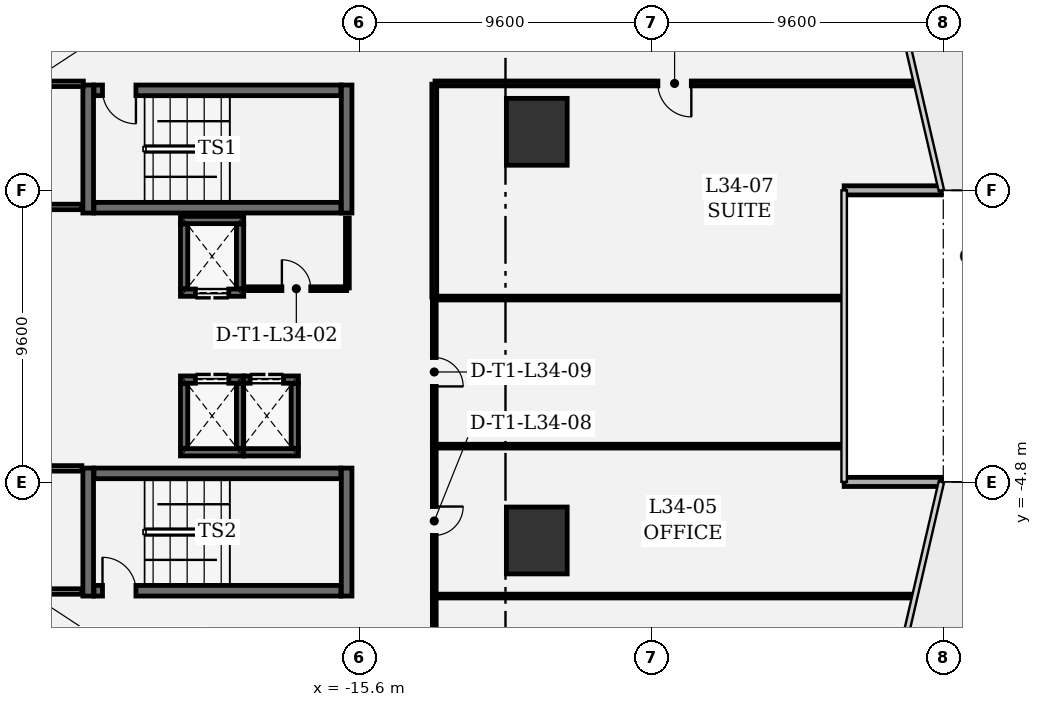
"""IFC4 building model, lengths in metres.
Left out: names, types, materials, properties, quantities, classifications, styles, units other than length and angle.
Written with IfcOpenShell. Run it as: python <this file> out.ifc"""

import sys

from ifc_helpers import new_model, si_unit, direction, frame, frame_2d, origin, origin_2d, place, context, subcontext, project, spatial, rectangle, extrude, element, fill, save


model = new_model("IFC4")
c1 = context("Model", 3, precision=1e-05, world=origin(), true_north=direction((0.0, 1.0)))
c2 = subcontext(c1, "Body", "Model", "MODEL_VIEW")
j1 = project(units=[si_unit("LENGTHUNIT", "METRE"), si_unit("PLANEANGLEUNIT", "RADIAN")], contexts=[c1])
p1 = place(None, origin())
s1 = spatial("IfcSite", under=j1, at=p1, CompositionType="ELEMENT")
p2 = place(p1, origin())
s2 = spatial("IfcBuilding", under=s1, at=p2, CompositionType="ELEMENT")
p3 = place(p2, frame((0.0, 0.0, 150.3)))
s3 = spatial("IfcBuildingStorey", under=s2, at=p3, CompositionType="ELEMENT", Elevation=150.3)
for number, where, z_axis, x_axis in (
    (1, (-9.77, -6.721, 0.0), (0.0, 0.0, 1.0), (1.0, 0.0, 0.0)),
    (2, (-9.77, 6.721, 0.0), (0.0, 0.0, 1.0), (1.0, 0.0, 0.0)),
):
    element("IfcColumn", number, at=place(p3, frame(where, z_axis=z_axis, x_axis=x_axis)), inside=s3, PredefinedType="COLUMN", context=c2, shape_type="SweptSolid", body=[
        extrude(rectangle(XDim=2.0, YDim=2.2, at=origin_2d()), origin(), (0.0, 0.0, 1.0), 4.05),
    ])
for number, where, z_axis, x_axis in (
    (3, (3.537, -4.795, 0.0), (0.0, 0.0, 1.0), (-1.0, 0.0, 0.0)),
    (4, (0.34, 4.795, 0.0), (0.0, 0.0, 1.0), (1.0, 0.0, 0.0)),
):
    element("IfcWall", number, at=place(p3, frame(where, z_axis=z_axis, x_axis=x_axis)), inside=s3, PredefinedType="SOLIDWALL", context=c2, shape_type="SweptSolid", body=[
        extrude(rectangle(XDim=3.197, YDim=0.3, at=frame_2d((1.598, 0.0))), origin(), (0.0, 0.0, 1.0), 3.78),
    ])
for number, where, z_axis, x_axis in (
    (5, (-24.525, 8.26, 0.0), (0.0, 0.0, 1.0), (0.0, -1.0, 0.0)),
    (6, (-16.025, 4.05, 0.0), (0.0, 0.0, 1.0), (0.0, 1.0, 0.0)),
):
    element("IfcWall", number, at=place(p3, frame(where, z_axis=z_axis, x_axis=x_axis)), inside=s3, PredefinedType="SHEAR", context=c2, shape_type="SweptSolid", body=[
        extrude(rectangle(XDim=4.21, YDim=0.35, at=frame_2d((2.105, 0.0))), origin(), (0.0, 0.0, 1.0), 3.78),
    ])
p4 = place(p3, frame((-24.335, 4.225, 0.0), z_axis=(0.0, 0.0, 1.0), x_axis=(1.0, 0.0, 0.0)))
e7 = element("IfcWall", 7, at=p4, inside=s3, PredefinedType="SHEAR", context=c2, shape_type="SweptSolid", body=[
    extrude(rectangle(XDim=8.12, YDim=0.35, at=frame_2d((4.06, 0.0))), origin(), (0.0, 0.0, 1.0), 3.78),
])
p5 = place(p3, frame((-16.215, 8.085, 0.0), z_axis=(0.0, 0.0, 1.0), x_axis=(-1.0, 0.0, 0.0)))
e8 = element("IfcWall", 8, at=p5, inside=s3, PredefinedType="SHEAR", context=c2, shape_type="SweptSolid", body=[
    extrude(rectangle(XDim=8.12, YDim=0.35, at=frame_2d((4.06, 0.0))), origin(), (0.0, 0.0, 1.0), 3.78),
])
p6 = place(p5, frame((6.74, 0.0, 0.0)))
e9 = element("IfcOpeningElement", 9, at=p6, cuts=e8, PredefinedType="OPENING", context=c2, shape_type="SweptSolid", body=[
    extrude(rectangle(XDim=1.1, YDim=2.2, at=frame_2d((0.55, 1.1))), frame((0.0, 0.185, 0.0), z_axis=(0.0, -1.0, 0.0), x_axis=(1.0, 0.0, 0.0)), (0.0, 0.0, 1.0), 0.37),
])
for number, where, z_axis, x_axis in (
    (10, (-24.525, -4.34, 0.0), (0.0, 0.0, 1.0), (0.0, -1.0, 0.0)),
    (11, (-16.025, -8.55, 0.0), (0.0, 0.0, 1.0), (0.0, 1.0, 0.0)),
):
    element("IfcWall", number, at=place(p3, frame(where, z_axis=z_axis, x_axis=x_axis)), inside=s3, PredefinedType="SHEAR", context=c2, shape_type="SweptSolid", body=[
        extrude(rectangle(XDim=4.21, YDim=0.35, at=frame_2d((2.105, 0.0))), origin(), (0.0, 0.0, 1.0), 3.78),
    ])
p7 = place(p3, frame((-24.335, -8.375, 0.0), z_axis=(0.0, 0.0, 1.0), x_axis=(1.0, 0.0, 0.0)))
e12 = element("IfcWall", 12, at=p7, inside=s3, PredefinedType="SHEAR", context=c2, shape_type="SweptSolid", body=[
    extrude(rectangle(XDim=8.12, YDim=0.35, at=frame_2d((4.06, 0.0))), origin(), (0.0, 0.0, 1.0), 3.78),
])
p8 = place(p7, frame((0.28, 0.0, 0.0)))
e13 = element("IfcOpeningElement", 13, at=p8, cuts=e12, PredefinedType="OPENING", context=c2, shape_type="SweptSolid", body=[
    extrude(rectangle(XDim=1.1, YDim=2.2, at=frame_2d((0.55, 1.1))), frame((0.0, 0.185, 0.0), z_axis=(0.0, -1.0, 0.0), x_axis=(1.0, 0.0, 0.0)), (0.0, 0.0, 1.0), 0.37),
])
p9 = place(p3, frame((-16.215, -4.515, 0.0), z_axis=(0.0, 0.0, 1.0), x_axis=(-1.0, 0.0, 0.0)))
e14 = element("IfcWall", 14, at=p9, inside=s3, PredefinedType="SHEAR", context=c2, shape_type="SweptSolid", body=[
    extrude(rectangle(XDim=8.12, YDim=0.35, at=frame_2d((4.06, 0.0))), origin(), (0.0, 0.0, 1.0), 3.78),
])
p10 = place(p3, frame((-19.41, 1.43, 0.0), z_axis=(0.0, 0.0, 1.0), x_axis=(-1.0, 0.0, 0.0)))
e15 = element("IfcWall", 15, at=p10, inside=s3, PredefinedType="SHEAR", context=c2, shape_type="SweptSolid", body=[
    extrude(rectangle(XDim=2.08, YDim=0.24, at=frame_2d((1.04, 0.0))), origin(), (0.0, 0.0, 1.0), 3.78),
])
p11 = place(p10, frame((0.49, 0.0, 0.0)))
e16 = element("IfcOpeningElement", 16, at=p11, cuts=e15, PredefinedType="OPENING", context=c2, shape_type="SweptSolid", body=[
    extrude(rectangle(XDim=1.1, YDim=2.2, at=frame_2d((0.55, 1.1))), frame((0.0, 0.13, 0.0), z_axis=(0.0, -1.0, 0.0), x_axis=(1.0, 0.0, 0.0)), (0.0, 0.0, 1.0), 0.26),
])
p12 = place(p3, frame((-21.49, 3.82, 0.0), z_axis=(0.0, 0.0, 1.0), x_axis=(1.0, 0.0, 0.0)))
e17 = element("IfcWall", 17, at=p12, inside=s3, PredefinedType="SHEAR", context=c2, shape_type="SweptSolid", body=[
    extrude(rectangle(XDim=2.08, YDim=0.24, at=frame_2d((1.04, 0.0))), origin(), (0.0, 0.0, 1.0), 3.78),
])
for number, where, z_axis, x_axis in (
    (18, (-21.37, 1.562, 0.0), (0.0, 0.0, 1.0), (0.0, 1.0, 0.0)),
    (19, (-19.53, 3.688, 0.0), (0.0, 0.0, 1.0), (0.0, -1.0, 0.0)),
):
    element("IfcWall", number, at=place(p3, frame(where, z_axis=z_axis, x_axis=x_axis)), inside=s3, PredefinedType="SHEAR", context=c2, shape_type="SweptSolid", body=[
        extrude(rectangle(XDim=2.126, YDim=0.24, at=frame_2d((1.063, 0.0))), origin(), (0.0, 0.0, 1.0), 3.78),
    ])
p13 = place(p3, frame((-19.41, -3.82, 0.0), z_axis=(0.0, 0.0, 1.0), x_axis=(-1.0, 0.0, 0.0)))
e20 = element("IfcWall", 20, at=p13, inside=s3, PredefinedType="SHEAR", context=c2, shape_type="SweptSolid", body=[
    extrude(rectangle(XDim=2.08, YDim=0.24, at=frame_2d((1.04, 0.0))), origin(), (0.0, 0.0, 1.0), 3.78),
])
p14 = place(p3, frame((-21.49, -1.43, 0.0), z_axis=(0.0, 0.0, 1.0), x_axis=(1.0, 0.0, 0.0)))
e21 = element("IfcWall", 21, at=p14, inside=s3, PredefinedType="SHEAR", context=c2, shape_type="SweptSolid", body=[
    extrude(rectangle(XDim=2.08, YDim=0.24, at=frame_2d((1.04, 0.0))), origin(), (0.0, 0.0, 1.0), 3.78),
])
p15 = place(p14, frame((0.49, 0.0, 0.0)))
e22 = element("IfcOpeningElement", 22, at=p15, cuts=e21, PredefinedType="OPENING", context=c2, shape_type="SweptSolid", body=[
    extrude(rectangle(XDim=1.1, YDim=2.2, at=frame_2d((0.55, 1.1))), frame((0.0, 0.13, 0.0), z_axis=(0.0, -1.0, 0.0), x_axis=(1.0, 0.0, 0.0)), (0.0, 0.0, 1.0), 0.26),
])
for number, where, z_axis, x_axis in (
    (23, (-21.37, -3.688, 0.0), (0.0, 0.0, 1.0), (0.0, 1.0, 0.0)),
    (24, (-19.53, -1.562, 0.0), (0.0, 0.0, 1.0), (0.0, -1.0, 0.0)),
):
    element("IfcWall", number, at=place(p3, frame(where, z_axis=z_axis, x_axis=x_axis)), inside=s3, PredefinedType="SHEAR", context=c2, shape_type="SweptSolid", body=[
        extrude(rectangle(XDim=2.126, YDim=0.24, at=frame_2d((1.063, 0.0))), origin(), (0.0, 0.0, 1.0), 3.78),
    ])
p16 = place(p3, frame((-17.61, -3.82, 0.0), z_axis=(0.0, 0.0, 1.0), x_axis=(-1.0, 0.0, 0.0)))
e25 = element("IfcWall", 25, at=p16, inside=s3, PredefinedType="SHEAR", context=c2, shape_type="SweptSolid", body=[
    extrude(rectangle(XDim=1.8, YDim=0.24, at=frame_2d((0.9, 0.0))), origin(), (0.0, 0.0, 1.0), 3.78),
])
p17 = place(p3, frame((-19.41, -1.43, 0.0), z_axis=(0.0, 0.0, 1.0), x_axis=(1.0, 0.0, 0.0)))
e26 = element("IfcWall", 26, at=p17, inside=s3, PredefinedType="SHEAR", context=c2, shape_type="SweptSolid", body=[
    extrude(rectangle(XDim=1.8, YDim=0.24, at=frame_2d((0.9, 0.0))), origin(), (0.0, 0.0, 1.0), 3.78),
])
p18 = place(p17, frame((0.21, 0.0, 0.0)))
e27 = element("IfcOpeningElement", 27, at=p18, cuts=e26, PredefinedType="OPENING", context=c2, shape_type="SweptSolid", body=[
    extrude(rectangle(XDim=1.1, YDim=2.2, at=frame_2d((0.55, 1.1))), frame((0.0, 0.13, 0.0), z_axis=(0.0, -1.0, 0.0), x_axis=(1.0, 0.0, 0.0)), (0.0, 0.0, 1.0), 0.26),
])
p19 = place(p3, frame((-17.73, -1.562, 0.0), z_axis=(0.0, 0.0, 1.0), x_axis=(0.0, -1.0, 0.0)))
e28 = element("IfcWall", 28, at=p19, inside=s3, PredefinedType="SHEAR", context=c2, shape_type="SweptSolid", body=[
    extrude(rectangle(XDim=2.126, YDim=0.24, at=frame_2d((1.063, 0.0))), origin(), (0.0, 0.0, 1.0), 3.78),
])
p20 = place(p3, frame((-28.355, 4.25, 0.0), z_axis=(0.0, 0.0, 1.0), x_axis=(1.0, 0.0, 0.0)))
e29 = element("IfcWall", 29, at=p20, inside=s3, PredefinedType="PARTITIONING", context=c2, shape_type="SweptSolid", body=[
    extrude(rectangle(XDim=3.622, YDim=0.18, at=frame_2d((1.811, 0.0))), origin(), (0.0, 0.0, 1.0), 3.78),
])
p21 = place(p3, frame((-24.684, 8.3, 0.0), z_axis=(0.0, 0.0, 1.0), x_axis=(-1.0, 0.0, 0.0)))
e30 = element("IfcWall", 30, at=p21, inside=s3, PredefinedType="PARTITIONING", context=c2, shape_type="SweptSolid", body=[
    extrude(rectangle(XDim=3.671, YDim=0.18, at=frame_2d((1.835, 0.0))), origin(), (0.0, 0.0, 1.0), 3.78),
])
p22 = place(p21, frame((1.335, 0.0, 0.0)))
e31 = element("IfcOpeningElement", 31, at=p22, cuts=e30, PredefinedType="OPENING", context=c2, shape_type="SweptSolid", body=[
    extrude(rectangle(XDim=1.0, YDim=2.15, at=frame_2d((0.5, 1.075))), frame((0.0, 0.1, 0.0), z_axis=(0.0, -1.0, 0.0), x_axis=(1.0, 0.0, 0.0)), (0.0, 0.0, 1.0), 0.2),
])
p23 = place(p3, frame((-28.355, -8.4, 0.0), z_axis=(0.0, 0.0, 1.0), x_axis=(1.0, 0.0, 0.0)))
e32 = element("IfcWall", 32, at=p23, inside=s3, PredefinedType="PARTITIONING", context=c2, shape_type="SweptSolid", body=[
    extrude(rectangle(XDim=3.622, YDim=0.18, at=frame_2d((1.811, 0.0))), origin(), (0.0, 0.0, 1.0), 3.78),
])
p24 = place(p23, frame((1.311, 0.0, 0.0)))
e33 = element("IfcOpeningElement", 33, at=p24, cuts=e32, PredefinedType="OPENING", context=c2, shape_type="SweptSolid", body=[
    extrude(rectangle(XDim=1.0, YDim=2.15, at=frame_2d((0.5, 1.075))), frame((0.0, 0.1, 0.0), z_axis=(0.0, -1.0, 0.0), x_axis=(1.0, 0.0, 0.0)), (0.0, 0.0, 1.0), 0.2),
])
p25 = place(p3, frame((-24.733, -4.35, 0.0), z_axis=(0.0, 0.0, 1.0), x_axis=(-1.0, 0.0, 0.0)))
e34 = element("IfcWall", 34, at=p25, inside=s3, PredefinedType="PARTITIONING", context=c2, shape_type="SweptSolid", body=[
    extrude(rectangle(XDim=3.622, YDim=0.18, at=frame_2d((1.811, 0.0))), origin(), (0.0, 0.0, 1.0), 3.78),
])
p26 = place(p3, frame((-19.334, 1.56, 0.0), z_axis=(0.0, 0.0, 1.0), x_axis=(1.0, 0.0, 0.0)))
e35 = element("IfcWall", 35, at=p26, inside=s3, PredefinedType="PARTITIONING", context=c2, shape_type="SweptSolid", body=[
    extrude(rectangle(XDim=3.309, YDim=0.125, at=frame_2d((1.654, 0.0))), origin(), (0.0, 0.0, 1.0), 3.78),
])
p27 = place(p26, frame((1.179, 0.0, 0.0)))
e36 = element("IfcOpeningElement", 36, at=p27, cuts=e35, PredefinedType="OPENING", context=c2, shape_type="SweptSolid", body=[
    extrude(rectangle(XDim=0.95, YDim=2.15, at=frame_2d((0.475, 1.075))), frame((0.0, 0.073, 0.0), z_axis=(0.0, -1.0, 0.0), x_axis=(1.0, 0.0, 0.0)), (0.0, 0.0, 1.0), 0.145),
])
p28 = place(p3, frame((-16.0, 1.585, 0.0), z_axis=(0.0, 0.0, 1.0), x_axis=(0.0, 1.0, 0.0)))
e37 = element("IfcWall", 37, at=p28, inside=s3, PredefinedType="PARTITIONING", context=c2, shape_type="SweptSolid", body=[
    extrude(rectangle(XDim=2.302, YDim=0.125, at=frame_2d((1.151, 0.0))), origin(), (0.0, 0.0, 1.0), 3.78),
])
p29 = place(p3, frame((2.587, -8.55, 0.0), z_axis=(0.0, 0.0, 1.0), x_axis=(-1.0, 0.0, 0.0)))
e38 = element("IfcWall", 38, at=p29, inside=s3, PredefinedType="PARTITIONING", context=c2, shape_type="SweptSolid", body=[
    extrude(rectangle(XDim=15.704, YDim=0.125, at=frame_2d((7.852, 0.0))), origin(), (0.0, 0.0, 1.0), 2.895),
])
p30 = place(p3, frame((-13.142, -10.933, 0.0), z_axis=(0.0, 0.0, 1.0), x_axis=(0.0, 1.0, 0.0)))
e39 = element("IfcWall", 39, at=p30, inside=s3, PredefinedType="PARTITIONING", context=c2, shape_type="SweptSolid", body=[
    extrude(rectangle(XDim=2.358, YDim=0.125, at=frame_2d((1.179, 0.0))), origin(), (0.0, 0.0, 1.0), 3.78),
])
p31 = place(p3, frame((0.26, -3.619, 0.0), z_axis=(0.0, 0.0, 1.0), x_axis=(-1.0, 0.0, 0.0)))
e40 = element("IfcWall", 40, at=p31, inside=s3, PredefinedType="PARTITIONING", context=c2, shape_type="SweptSolid", body=[
    extrude(rectangle(XDim=13.377, YDim=0.125, at=frame_2d((6.688, 0.0))), origin(), (0.0, 0.0, 1.0), 3.78),
])
p32 = place(p3, frame((-13.142, -3.644, 0.0), z_axis=(0.0, 0.0, 1.0), x_axis=(0.0, -1.0, 0.0)))
e41 = element("IfcWall", 41, at=p32, inside=s3, PredefinedType="PARTITIONING", context=c2, shape_type="SweptSolid", body=[
    extrude(rectangle(XDim=4.873, YDim=0.125, at=frame_2d((2.437, 0.0))), origin(), (0.0, 0.0, 1.0), 3.78),
])
p33 = place(p32, frame((1.962, 0.0, 0.0)))
e42 = element("IfcOpeningElement", 42, at=p33, cuts=e41, PredefinedType="OPENING", context=c2, shape_type="SweptSolid", body=[
    extrude(rectangle(XDim=0.95, YDim=2.15, at=frame_2d((0.475, 1.075))), frame((0.0, 0.073, 0.0), z_axis=(0.0, -1.0, 0.0), x_axis=(1.0, 0.0, 0.0)), (0.0, 0.0, 1.0), 0.145),
])
p34 = place(p3, frame((-13.142, 1.227, 0.0), z_axis=(0.0, 0.0, 1.0), x_axis=(0.0, -1.0, 0.0)))
e43 = element("IfcWall", 43, at=p34, inside=s3, PredefinedType="PARTITIONING", context=c2, shape_type="SweptSolid", body=[
    extrude(rectangle(XDim=4.813, YDim=0.125, at=frame_2d((2.406, 0.0))), origin(), (0.0, 0.0, 1.0), 3.78),
])
p35 = place(p34, frame((1.931, 0.0, 0.0)))
e44 = element("IfcOpeningElement", 44, at=p35, cuts=e43, PredefinedType="OPENING", context=c2, shape_type="SweptSolid", body=[
    extrude(rectangle(XDim=0.95, YDim=2.15, at=frame_2d((0.475, 1.075))), frame((0.0, 0.073, 0.0), z_axis=(0.0, -1.0, 0.0), x_axis=(1.0, 0.0, 0.0)), (0.0, 0.0, 1.0), 0.145),
])
p36 = place(p3, frame((0.26, 1.252, 0.0), z_axis=(0.0, 0.0, 1.0), x_axis=(-1.0, 0.0, 0.0)))
e45 = element("IfcWall", 45, at=p36, inside=s3, PredefinedType="PARTITIONING", context=c2, shape_type="SweptSolid", body=[
    extrude(rectangle(XDim=13.377, YDim=0.125, at=frame_2d((6.688, 0.0))), origin(), (0.0, 0.0, 1.0), 3.78),
])
p37 = place(p3, frame((2.642, 8.312, 0.0), z_axis=(0.0, 0.0, 1.0), x_axis=(-1.0, 0.0, 0.0)))
e46 = element("IfcWall", 46, at=p37, inside=s3, PredefinedType="PARTITIONING", context=c2, shape_type="SweptSolid", body=[
    extrude(rectangle(XDim=15.759, YDim=0.16, at=frame_2d((7.88, 0.0))), origin(), (0.0, 0.0, 1.0), 2.895),
])
p38 = place(p37, frame((7.33, 0.0, 0.0)))
e47 = element("IfcOpeningElement", 47, at=p38, cuts=e46, PredefinedType="OPENING", context=c2, shape_type="SweptSolid", body=[
    extrude(rectangle(XDim=1.1, YDim=2.15, at=frame_2d((0.55, 1.075))), frame((0.0, 0.09, 0.0), z_axis=(0.0, -1.0, 0.0), x_axis=(1.0, 0.0, 0.0)), (0.0, 0.0, 1.0), 0.18),
])
p39 = place(p3, frame((-13.142, 8.287, 0.0), z_axis=(0.0, 0.0, 1.0), x_axis=(0.0, -1.0, 0.0)))
e48 = element("IfcWall", 48, at=p39, inside=s3, PredefinedType="PARTITIONING", context=c2, shape_type="SweptSolid", body=[
    extrude(rectangle(XDim=7.002, YDim=0.16, at=frame_2d((3.501, 0.0))), origin(), (0.0, 0.0, 1.0), 3.78),
])
p40 = place(p6, origin())
e49 = element("IfcDoor", 49, at=p40, inside=s3, OperationType="SINGLE_SWING_LEFT", PredefinedType="DOOR", context=c2, shape_type="SweptSolid", body=[
    extrude(rectangle(XDim=1.1, YDim=2.2, at=frame_2d((0.55, 1.1))), frame((0.0, 0.025, 0.0), z_axis=(0.0, -1.0, 0.0), x_axis=(1.0, 0.0, 0.0)), (0.0, 0.0, 1.0), 0.05),
])
fill(e9, e49)
p41 = place(p8, origin())
e50 = element("IfcDoor", 50, at=p41, inside=s3, OperationType="SINGLE_SWING_LEFT", PredefinedType="DOOR", context=c2, shape_type="SweptSolid", body=[
    extrude(rectangle(XDim=1.1, YDim=2.2, at=frame_2d((0.55, 1.1))), frame((0.0, 0.025, 0.0), z_axis=(0.0, -1.0, 0.0), x_axis=(1.0, 0.0, 0.0)), (0.0, 0.0, 1.0), 0.05),
])
fill(e13, e50)
p42 = place(p11, origin())
e51 = element("IfcDoor", 51, at=p42, inside=s3, OperationType="DOUBLE_DOOR_SLIDING", PredefinedType="DOOR", context=c2, shape_type="SweptSolid", body=[
    extrude(rectangle(XDim=1.1, YDim=2.2, at=frame_2d((0.55, 1.1))), frame((0.0, 0.025, 0.0), z_axis=(0.0, -1.0, 0.0), x_axis=(1.0, 0.0, 0.0)), (0.0, 0.0, 1.0), 0.05),
])
fill(e16, e51)
p43 = place(p15, origin())
e52 = element("IfcDoor", 52, at=p43, inside=s3, OperationType="DOUBLE_DOOR_SLIDING", PredefinedType="DOOR", context=c2, shape_type="SweptSolid", body=[
    extrude(rectangle(XDim=1.1, YDim=2.2, at=frame_2d((0.55, 1.1))), frame((0.0, 0.025, 0.0), z_axis=(0.0, -1.0, 0.0), x_axis=(1.0, 0.0, 0.0)), (0.0, 0.0, 1.0), 0.05),
])
fill(e22, e52)
p44 = place(p18, origin())
e53 = element("IfcDoor", 53, at=p44, inside=s3, OperationType="DOUBLE_DOOR_SLIDING", PredefinedType="DOOR", context=c2, shape_type="SweptSolid", body=[
    extrude(rectangle(XDim=1.1, YDim=2.2, at=frame_2d((0.55, 1.1))), frame((0.0, 0.025, 0.0), z_axis=(0.0, -1.0, 0.0), x_axis=(1.0, 0.0, 0.0)), (0.0, 0.0, 1.0), 0.05),
])
fill(e27, e53)
p45 = place(p27, origin())
e54 = element("IfcDoor", 54, at=p45, inside=s3, OperationType="SINGLE_SWING_LEFT", PredefinedType="DOOR", context=c2, shape_type="SweptSolid", body=[
    extrude(rectangle(XDim=0.95, YDim=2.15, at=frame_2d((0.475, 1.075))), frame((0.0, 0.025, 0.0), z_axis=(0.0, -1.0, 0.0), x_axis=(1.0, 0.0, 0.0)), (0.0, 0.0, 1.0), 0.05),
])
fill(e36, e54)
p46 = place(p33, origin())
e55 = element("IfcDoor", 55, at=p46, inside=s3, OperationType="SINGLE_SWING_LEFT", PredefinedType="DOOR", context=c2, shape_type="SweptSolid", body=[
    extrude(rectangle(XDim=0.95, YDim=2.15, at=frame_2d((0.475, 1.075))), frame((0.0, 0.025, 0.0), z_axis=(0.0, -1.0, 0.0), x_axis=(1.0, 0.0, 0.0)), (0.0, 0.0, 1.0), 0.05),
])
fill(e42, e55)
p47 = place(p35, origin())
e56 = element("IfcDoor", 56, at=p47, inside=s3, OperationType="SINGLE_SWING_RIGHT", PredefinedType="DOOR", context=c2, shape_type="SweptSolid", body=[
    extrude(rectangle(XDim=0.95, YDim=2.15, at=frame_2d((0.475, 1.075))), frame((0.0, 0.025, 0.0), z_axis=(0.0, -1.0, 0.0), x_axis=(1.0, 0.0, 0.0)), (0.0, 0.0, 1.0), 0.05),
])
fill(e44, e56)
p48 = place(p38, origin())
e57 = element("IfcDoor", 57, at=p48, inside=s3, OperationType="SINGLE_SWING_LEFT", PredefinedType="DOOR", context=c2, shape_type="SweptSolid", body=[
    extrude(rectangle(XDim=1.1, YDim=2.15, at=frame_2d((0.55, 1.075))), frame((0.0, 0.025, 0.0), z_axis=(0.0, -1.0, 0.0), x_axis=(1.0, 0.0, 0.0)), (0.0, 0.0, 1.0), 0.05),
])
fill(e47, e57)
save(model, sys.argv[1])
